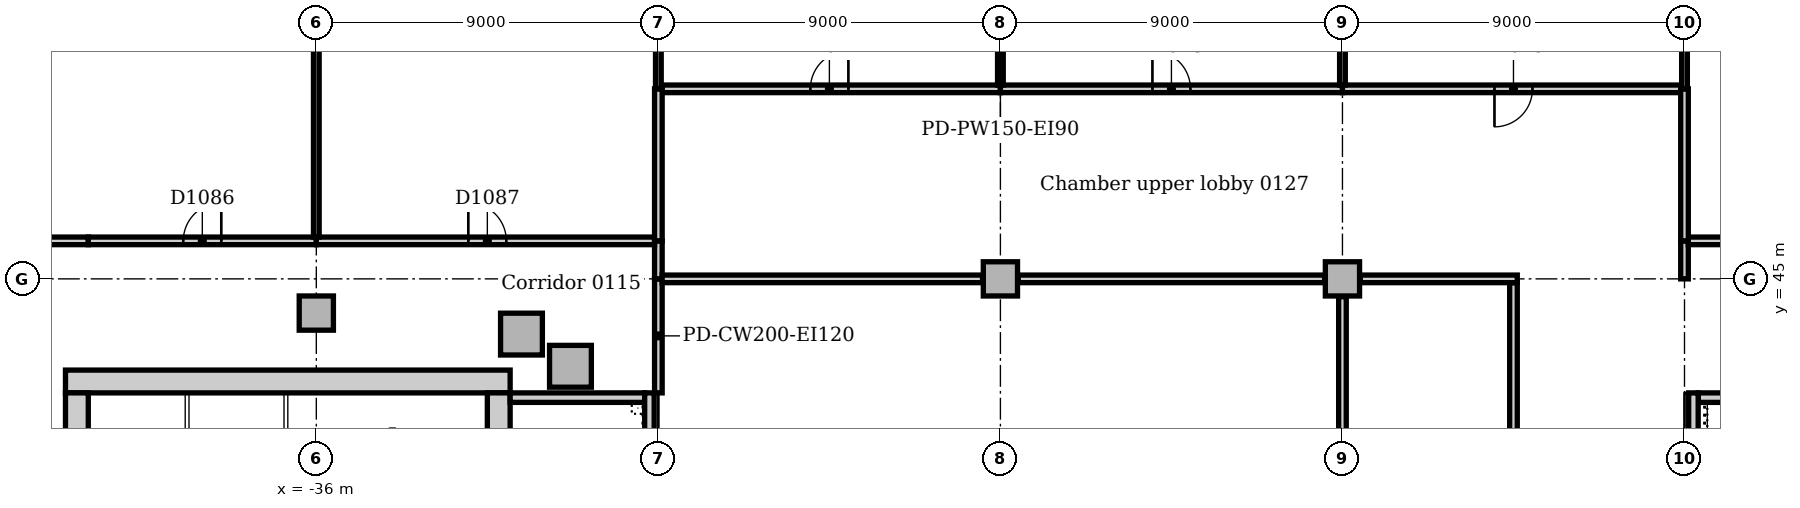
"""IFC4 building model, lengths in metres.
Left out: names, types, materials, properties, quantities, classifications, styles, units other than length and angle.
Written with IfcOpenShell. Run it as: python <this file> out.ifc"""

import sys

from ifc_helpers import new_model, si_unit, direction, frame, frame_2d, origin, origin_2d, place, context, subcontext, project, spatial, rectangle, extrude, element, fill, save


model = new_model("IFC4")
c1 = context("Model", 3, precision=1e-05, world=origin(), true_north=direction((0.0, 1.0)))
c2 = subcontext(c1, "Body", "Model", "MODEL_VIEW")
j1 = project(units=[si_unit("LENGTHUNIT", "METRE"), si_unit("PLANEANGLEUNIT", "RADIAN")], contexts=[c1])
p1 = place(None, origin())
s1 = spatial("IfcSite", under=j1, at=p1, CompositionType="ELEMENT")
p2 = place(p1, origin())
s2 = spatial("IfcBuilding", under=s1, at=p2, CompositionType="ELEMENT")
p3 = place(p2, frame((0.0, 0.0, 6.0)))
s3 = spatial("IfcBuildingStorey", under=s2, at=p3, CompositionType="ELEMENT", Elevation=6.0)
p4 = place(p3, frame((3.9, 41.875, 0.0), z_axis=(0.0, 0.0, 1.0), x_axis=(-1.0, 0.0, 0.0)))
e1 = element("IfcWall", 1, at=p4, inside=s3, PredefinedType="SOLIDWALL", context=c2, shape_type="SweptSolid", body=[
    extrude(rectangle(XDim=3.54, YDim=0.25, at=frame_2d((1.77, 0.0))), origin(), (0.0, 0.0, 1.0), 5.0),
])
p5 = place(p3, frame((0.235, 21.0, 0.0), z_axis=(0.0, 0.0, 1.0), x_axis=(0.0, 1.0, 0.0)))
e2 = element("IfcWall", 2, at=p5, inside=s3, PredefinedType="SOLIDWALL", context=c2, shape_type="SweptSolid", body=[
    extrude(rectangle(XDim=21.0, YDim=0.25, at=frame_2d((10.5, 0.0))), origin(), (0.0, 0.0, 1.0), 5.0),
])
p6 = place(p3, frame((-30.9, 42.3, 0.0), z_axis=(0.0, 0.0, 1.0), x_axis=(-1.0, 0.0, 0.0)))
e3 = element("IfcWall", 3, at=p6, inside=s3, PredefinedType="SOLIDWALL", context=c2, shape_type="SweptSolid", body=[
    extrude(rectangle(XDim=11.7, YDim=0.6, at=frame_2d((5.85, 0.0))), origin(), (0.0, 0.0, 1.0), 5.0),
])
p7 = place(p3, frame((-31.2, 30.5, 0.0), z_axis=(0.0, 0.0, 1.0), x_axis=(0.0, 1.0, 0.0)))
e4 = element("IfcWall", 4, at=p7, inside=s3, PredefinedType="SOLIDWALL", context=c2, shape_type="SweptSolid", body=[
    extrude(rectangle(XDim=11.5, YDim=0.6, at=frame_2d((5.75, 0.0))), origin(), (0.0, 0.0, 1.0), 5.0),
])
p8 = place(p7, frame((0.85, 0.0, 0.0)))
e5 = element("IfcOpeningElement", 5, at=p8, cuts=e4, PredefinedType="OPENING", context=c2, shape_type="SweptSolid", body=[
    extrude(rectangle(XDim=1.8, YDim=2.1, at=frame_2d((0.9, 1.05))), frame((0.0, 0.31, 0.0), z_axis=(0.0, -1.0, 0.0), x_axis=(1.0, 0.0, 0.0)), (0.0, 0.0, 1.0), 0.62),
])
p9 = place(p3, frame((-42.3, 42.0, 0.0), z_axis=(0.0, 0.0, 1.0), x_axis=(0.0, -1.0, 0.0)))
e6 = element("IfcWall", 6, at=p9, inside=s3, PredefinedType="SOLIDWALL", context=c2, shape_type="SweptSolid", body=[
    extrude(rectangle(XDim=11.5, YDim=0.6, at=frame_2d((5.75, 0.0))), origin(), (0.0, 0.0, 1.0), 5.0),
])
p10 = place(p9, frame((8.85, 0.0, 0.0)))
e7 = element("IfcOpeningElement", 7, at=p10, cuts=e6, PredefinedType="OPENING", context=c2, shape_type="SweptSolid", body=[
    extrude(rectangle(XDim=1.8, YDim=2.1, at=frame_2d((0.9, 1.05))), frame((0.0, 0.31, 0.0), z_axis=(0.0, -1.0, 0.0), x_axis=(1.0, 0.0, 0.0)), (0.0, 0.0, 1.0), 0.62),
])
p11 = place(p3, frame((-27.36, 41.875, 0.0), z_axis=(0.0, 0.0, 1.0), x_axis=(-1.0, 0.0, 0.0)))
e8 = element("IfcWall", 8, at=p11, inside=s3, PredefinedType="SOLIDWALL", context=c2, shape_type="SweptSolid", body=[
    extrude(rectangle(XDim=3.54, YDim=0.25, at=frame_2d((1.77, 0.0))), origin(), (0.0, 0.0, 1.0), 5.0),
])
p12 = place(p3, frame((-27.235, 35.35, 0.0), z_axis=(0.0, 0.0, 1.0), x_axis=(0.0, 1.0, 0.0)))
e9 = element("IfcWall", 9, at=p12, inside=s3, PredefinedType="SOLIDWALL", context=c2, shape_type="SweptSolid", body=[
    extrude(rectangle(XDim=6.65, YDim=0.25, at=frame_2d((3.325, 0.0))), origin(), (0.0, 0.0, 1.0), 5.0),
])
for number, where, z_axis, x_axis in (
    (10, (-29.313, 42.7, 0.0), (0.0, 0.0, 1.0), (1.0, 0.0, 0.0)),
    (11, (-30.602, 43.547, 0.0), (0.0, 0.0, 1.0), (1.0, 0.0, 0.0)),
):
    element("IfcColumn", number, at=place(p3, frame(where, z_axis=z_axis, x_axis=x_axis)), inside=s3, PredefinedType="COLUMN", context=c2, shape_type="SweptSolid", body=[
        extrude(rectangle(XDim=1.1, YDim=1.1, at=origin_2d()), origin(), (0.0, 0.0, 1.0), 4.7),
    ])
for number, where, z_axis, x_axis in (
    (12, (-36.0, 44.1, 0.0), (0.0, 0.0, 1.0), (1.0, 0.0, 0.0)),
    (13, (-18.0, 45.0, 0.0), (0.0, 0.0, 1.0), (1.0, 0.0, 0.0)),
    (14, (-9.0, 45.0, 0.0), (0.0, 0.0, 1.0), (1.0, 0.0, 0.0)),
):
    element("IfcColumn", number, at=place(p3, frame(where, z_axis=z_axis, x_axis=x_axis)), inside=s3, PredefinedType="COLUMN", context=c2, shape_type="SweptSolid", body=[
        extrude(rectangle(XDim=0.9, YDim=0.9, at=origin_2d()), origin(), (0.0, 0.0, 1.0), 4.7),
    ])
p13 = place(p3, frame((-44.9, 46.0, 0.0), z_axis=(0.0, 0.0, 1.0), x_axis=(1.0, 0.0, 0.0)))
e15 = element("IfcWall", 15, at=p13, inside=s3, PredefinedType="PARTITIONING", context=c2, shape_type="SweptSolid", body=[
    extrude(rectangle(XDim=2.9, YDim=0.2, at=frame_2d((1.45, 0.0))), origin(), (0.0, 0.0, 1.0), 4.7),
])
p14 = place(p3, frame((-27.0, 42.0, 0.0), z_axis=(0.0, 0.0, 1.0), x_axis=(0.0, 1.0, 0.0)))
e16 = element("IfcWall", 16, at=p14, inside=s3, PredefinedType="PARTITIONING", context=c2, shape_type="SweptSolid", body=[
    extrude(rectangle(XDim=3.0, YDim=0.2, at=frame_2d((1.5, 0.0))), origin(), (0.0, 0.0, 1.0), 4.7),
])
p15 = place(p3, frame((-27.0, 45.0, 0.0), z_axis=(0.0, 0.0, 1.0), x_axis=(0.0, 1.0, 0.0)))
e17 = element("IfcWall", 17, at=p15, inside=s3, PredefinedType="PARTITIONING", context=c2, shape_type="SweptSolid", body=[
    extrude(rectangle(XDim=1.0, YDim=0.2, at=frame_2d((0.5, 0.0))), origin(), (0.0, 0.0, 1.0), 4.7),
])
p16 = place(p3, frame((-42.0, 46.0, 0.0), z_axis=(0.0, 0.0, 1.0), x_axis=(1.0, 0.0, 0.0)))
e18 = element("IfcWall", 18, at=p16, inside=s3, PredefinedType="PARTITIONING", context=c2, shape_type="SweptSolid", body=[
    extrude(rectangle(XDim=6.0, YDim=0.2, at=frame_2d((3.0, 0.0))), origin(), (0.0, 0.0, 1.0), 4.7),
])
p17 = place(p16, frame((2.5, 0.0, 0.0)))
e19 = element("IfcOpeningElement", 19, at=p17, cuts=e18, PredefinedType="OPENING", context=c2, shape_type="SweptSolid", body=[
    extrude(rectangle(XDim=1.0, YDim=2.1, at=frame_2d((0.5, 1.05))), frame((0.0, 0.11, 0.0), z_axis=(0.0, -1.0, 0.0), x_axis=(1.0, 0.0, 0.0)), (0.0, 0.0, 1.0), 0.22),
])
p18 = place(p3, frame((-36.0, 46.0, 0.0), z_axis=(0.0, 0.0, 1.0), x_axis=(1.0, 0.0, 0.0)))
e20 = element("IfcWall", 20, at=p18, inside=s3, PredefinedType="PARTITIONING", context=c2, shape_type="SweptSolid", body=[
    extrude(rectangle(XDim=8.9, YDim=0.2, at=frame_2d((4.45, 0.0))), origin(), (0.0, 0.0, 1.0), 4.7),
])
p19 = place(p18, frame((4.0, 0.0, 0.0)))
e21 = element("IfcOpeningElement", 21, at=p19, cuts=e20, PredefinedType="OPENING", context=c2, shape_type="SweptSolid", body=[
    extrude(rectangle(XDim=1.0, YDim=2.1, at=frame_2d((0.5, 1.05))), frame((0.0, 0.11, 0.0), z_axis=(0.0, -1.0, 0.0), x_axis=(1.0, 0.0, 0.0)), (0.0, 0.0, 1.0), 0.22),
])
p20 = place(p3, frame((0.0, 45.0, 0.0), z_axis=(0.0, 0.0, 1.0), x_axis=(0.0, 1.0, 0.0)))
e22 = element("IfcWall", 22, at=p20, inside=s3, PredefinedType="PARTITIONING", context=c2, shape_type="SweptSolid", body=[
    extrude(rectangle(XDim=1.0, YDim=0.2, at=frame_2d((0.5, 0.0))), origin(), (0.0, 0.0, 1.0), 4.7),
])
p21 = place(p3, frame((0.1, 46.0, 0.0), z_axis=(0.0, 0.0, 1.0), x_axis=(1.0, 0.0, 0.0)))
e23 = element("IfcWall", 23, at=p21, inside=s3, PredefinedType="PARTITIONING", context=c2, shape_type="SweptSolid", body=[
    extrude(rectangle(XDim=8.9, YDim=0.2, at=frame_2d((4.45, 0.0))), origin(), (0.0, 0.0, 1.0), 4.7),
])
p22 = place(p21, frame((3.9, 0.0, 0.0)))
e24 = element("IfcOpeningElement", 24, at=p22, cuts=e23, PredefinedType="OPENING", context=c2, shape_type="SweptSolid", body=[
    extrude(rectangle(XDim=1.0, YDim=2.1, at=frame_2d((0.5, 1.05))), frame((0.0, 0.11, 0.0), z_axis=(0.0, -1.0, 0.0), x_axis=(1.0, 0.0, 0.0)), (0.0, 0.0, 1.0), 0.22),
])
p23 = place(p3, frame((-4.5, 36.1, 0.0), z_axis=(0.0, 0.0, 1.0), x_axis=(0.0, 1.0, 0.0)))
e25 = element("IfcWall", 25, at=p23, inside=s3, PredefinedType="PARTITIONING", context=c2, shape_type="SweptSolid", body=[
    extrude(rectangle(XDim=8.8, YDim=0.2, at=frame_2d((4.4, 0.0))), origin(), (0.0, 0.0, 1.0), 4.7),
])
p24 = place(p3, frame((-9.0, 36.47, 0.0), z_axis=(0.0, 0.0, 1.0), x_axis=(0.0, 1.0, 0.0)))
e26 = element("IfcWall", 26, at=p24, inside=s3, PredefinedType="PARTITIONING", context=c2, shape_type="SweptSolid", body=[
    extrude(rectangle(XDim=8.06, YDim=0.2, at=frame_2d((4.03, 0.0))), origin(), (0.0, 0.0, 1.0), 4.7),
])
p25 = place(p24, frame((1.28, 0.0, 0.0)))
e27 = element("IfcOpeningElement", 27, at=p25, cuts=e26, PredefinedType="OPENING", context=c2, shape_type="SweptSolid", body=[
    extrude(rectangle(XDim=1.0, YDim=2.1, at=frame_2d((0.5, 1.05))), frame((0.0, 0.11, 0.0), z_axis=(0.0, -1.0, 0.0), x_axis=(1.0, 0.0, 0.0)), (0.0, 0.0, 1.0), 0.22),
])
p26 = place(p3, frame((-8.53, 45.0, 0.0), z_axis=(0.0, 0.0, 1.0), x_axis=(1.0, 0.0, 0.0)))
e28 = element("IfcWall", 28, at=p26, inside=s3, PredefinedType="PARTITIONING", context=c2, shape_type="SweptSolid", body=[
    extrude(rectangle(XDim=4.13, YDim=0.2, at=frame_2d((2.065, 0.0))), origin(), (0.0, 0.0, 1.0), 4.7),
])
p27 = place(p3, frame((-26.9, 45.0, 0.0), z_axis=(0.0, 0.0, 1.0), x_axis=(1.0, 0.0, 0.0)))
e29 = element("IfcWall", 29, at=p27, inside=s3, PredefinedType="PARTITIONING", context=c2, shape_type="SweptSolid", body=[
    extrude(rectangle(XDim=8.43, YDim=0.2, at=frame_2d((4.215, 0.0))), origin(), (0.0, 0.0, 1.0), 4.7),
])
p28 = place(p3, frame((-17.53, 45.0, 0.0), z_axis=(0.0, 0.0, 1.0), x_axis=(1.0, 0.0, 0.0)))
e30 = element("IfcWall", 30, at=p28, inside=s3, PredefinedType="PARTITIONING", context=c2, shape_type="SweptSolid", body=[
    extrude(rectangle(XDim=8.06, YDim=0.2, at=frame_2d((4.03, 0.0))), origin(), (0.0, 0.0, 1.0), 4.7),
])
p29 = place(p3, frame((-26.9, 50.0, 0.0), z_axis=(0.0, 0.0, 1.0), x_axis=(1.0, 0.0, 0.0)))
e31 = element("IfcWall", 31, at=p29, inside=s3, PredefinedType="PARTITIONING", context=c2, shape_type="SweptSolid", body=[
    extrude(rectangle(XDim=8.9, YDim=0.2, at=frame_2d((4.45, 0.0))), origin(), (0.0, 0.0, 1.0), 4.7),
])
p30 = place(p29, frame((3.9, 0.0, 0.0)))
e32 = element("IfcOpeningElement", 32, at=p30, cuts=e31, PredefinedType="OPENING", context=c2, shape_type="SweptSolid", body=[
    extrude(rectangle(XDim=1.0, YDim=2.1, at=frame_2d((0.5, 1.05))), frame((0.0, 0.11, 0.0), z_axis=(0.0, -1.0, 0.0), x_axis=(1.0, 0.0, 0.0)), (0.0, 0.0, 1.0), 0.22),
])
p31 = place(p3, frame((-18.0, 50.0, 0.0), z_axis=(0.0, 0.0, 1.0), x_axis=(1.0, 0.0, 0.0)))
e33 = element("IfcWall", 33, at=p31, inside=s3, PredefinedType="PARTITIONING", context=c2, shape_type="SweptSolid", body=[
    extrude(rectangle(XDim=9.0, YDim=0.2, at=frame_2d((4.5, 0.0))), origin(), (0.0, 0.0, 1.0), 4.7),
])
p32 = place(p31, frame((4.0, 0.0, 0.0)))
e34 = element("IfcOpeningElement", 34, at=p32, cuts=e33, PredefinedType="OPENING", context=c2, shape_type="SweptSolid", body=[
    extrude(rectangle(XDim=1.0, YDim=2.1, at=frame_2d((0.5, 1.05))), frame((0.0, 0.11, 0.0), z_axis=(0.0, -1.0, 0.0), x_axis=(1.0, 0.0, 0.0)), (0.0, 0.0, 1.0), 0.22),
])
p33 = place(p3, frame((-9.0, 50.0, 0.0), z_axis=(0.0, 0.0, 1.0), x_axis=(1.0, 0.0, 0.0)))
e35 = element("IfcWall", 35, at=p33, inside=s3, PredefinedType="PARTITIONING", context=c2, shape_type="SweptSolid", body=[
    extrude(rectangle(XDim=8.9, YDim=0.2, at=frame_2d((4.45, 0.0))), origin(), (0.0, 0.0, 1.0), 4.7),
])
p34 = place(p33, frame((4.0, 0.0, 0.0)))
e36 = element("IfcOpeningElement", 36, at=p34, cuts=e35, PredefinedType="OPENING", context=c2, shape_type="SweptSolid", body=[
    extrude(rectangle(XDim=1.0, YDim=2.1, at=frame_2d((0.5, 1.05))), frame((0.0, 0.11, 0.0), z_axis=(0.0, -1.0, 0.0), x_axis=(1.0, 0.0, 0.0)), (0.0, 0.0, 1.0), 0.22),
])
for number, where, z_axis, x_axis in (
    (37, (-27.0, 46.0, 0.0), (0.0, 0.0, 1.0), (0.0, 1.0, 0.0)),
    (38, (0.0, 46.0, 0.0), (0.0, 0.0, 1.0), (0.0, 1.0, 0.0)),
):
    element("IfcWall", number, at=place(p3, frame(where, z_axis=z_axis, x_axis=x_axis)), inside=s3, PredefinedType="PARTITIONING", context=c2, shape_type="SweptSolid", body=[
        extrude(rectangle(XDim=4.0, YDim=0.2, at=frame_2d((2.0, 0.0))), origin(), (0.0, 0.0, 1.0), 4.7),
    ])
p35 = place(p3, frame((-18.0, 50.1, 0.0), z_axis=(0.0, 0.0, 1.0), x_axis=(0.0, 1.0, 0.0)))
e39 = element("IfcWall", 39, at=p35, inside=s3, PredefinedType="PARTITIONING", context=c2, shape_type="SweptSolid", body=[
    extrude(rectangle(XDim=3.43, YDim=0.15, at=frame_2d((1.715, 0.0))), origin(), (0.0, 0.0, 1.0), 4.7),
])
p36 = place(p3, frame((-27.0, 50.0, 0.0), z_axis=(0.0, 0.0, 1.0), x_axis=(0.0, 1.0, 0.0)))
e40 = element("IfcWall", 40, at=p36, inside=s3, PredefinedType="PARTITIONING", context=c2, shape_type="SweptSolid", body=[
    extrude(rectangle(XDim=3.53, YDim=0.15, at=frame_2d((1.765, 0.0))), origin(), (0.0, 0.0, 1.0), 4.7),
])
p37 = place(p3, frame((-9.0, 50.1, 0.0), z_axis=(0.0, 0.0, 1.0), x_axis=(0.0, 1.0, 0.0)))
e41 = element("IfcWall", 41, at=p37, inside=s3, PredefinedType="PARTITIONING", context=c2, shape_type="SweptSolid", body=[
    extrude(rectangle(XDim=3.43, YDim=0.15, at=frame_2d((1.715, 0.0))), origin(), (0.0, 0.0, 1.0), 4.7),
])
p38 = place(p3, frame((0.0, 50.0, 0.0), z_axis=(0.0, 0.0, 1.0), x_axis=(0.0, 1.0, 0.0)))
e42 = element("IfcWall", 42, at=p38, inside=s3, PredefinedType="PARTITIONING", context=c2, shape_type="SweptSolid", body=[
    extrude(rectangle(XDim=3.53, YDim=0.15, at=frame_2d((1.765, 0.0))), origin(), (0.0, 0.0, 1.0), 4.7),
])
p39 = place(p3, frame((-36.0, 46.1, 0.0), z_axis=(0.0, 0.0, 1.0), x_axis=(0.0, 1.0, 0.0)))
e43 = element("IfcWall", 43, at=p39, inside=s3, PredefinedType="PARTITIONING", context=c2, shape_type="SweptSolid", body=[
    extrude(rectangle(XDim=7.43, YDim=0.15, at=frame_2d((3.715, 0.0))), origin(), (0.0, 0.0, 1.0), 4.7),
])
p40 = place(p3, frame((0.48, 39.795, 0.0), z_axis=(0.0, 0.0, 1.0), x_axis=(0.0, 1.0, 0.0)))
e44 = element("IfcWall", 44, at=p40, inside=s3, PredefinedType="STANDARD", context=c2, shape_type="SweptSolid", body=[
    extrude(rectangle(XDim=1.955, YDim=0.24, at=frame_2d((0.978, 0.0))), origin(), (0.0, 0.0, 1.0), 5.0),
])
p41 = place(p3, frame((-34.0, 41.075, 0.0), z_axis=(0.0, 0.0, 1.0), x_axis=(0.0, -1.0, 0.0)))
e45 = element("IfcWall", 45, at=p41, inside=s3, PredefinedType="SOLIDWALL", context=c2, shape_type="SweptSolid", body=[
    extrude(rectangle(XDim=7.0, YDim=0.15, at=frame_2d((3.5, 0.0))), origin(), (0.0, 0.0, 1.0), 5.0),
])
for number, where, z_axis, x_axis in (
    (46, (-39.4, 34.075, 0.0), (0.0, 0.0, 1.0), (0.0, 1.0, 0.0)),
    (47, (-36.8, 34.075, 0.0), (0.0, 0.0, 1.0), (0.0, 1.0, 0.0)),
):
    element("IfcWall", number, at=place(p3, frame(where, z_axis=z_axis, x_axis=x_axis)), inside=s3, PredefinedType="PARTITIONING", context=c2, shape_type="SweptSolid", body=[
        extrude(rectangle(XDim=7.925, YDim=0.1, at=frame_2d((3.962, 0.0))), origin(), (0.0, 0.0, 1.0), 4.7),
    ])
p42 = place(p30, origin())
e48 = element("IfcDoor", 48, at=p42, inside=s3, OperationType="SINGLE_SWING_RIGHT", PredefinedType="DOOR", context=c2, shape_type="SweptSolid", body=[
    extrude(rectangle(XDim=1.0, YDim=2.1, at=frame_2d((0.5, 1.05))), frame((0.0, 0.025, 0.0), z_axis=(0.0, -1.0, 0.0), x_axis=(1.0, 0.0, 0.0)), (0.0, 0.0, 1.0), 0.05),
])
fill(e32, e48)
p43 = place(p32, origin())
e49 = element("IfcDoor", 49, at=p43, inside=s3, OperationType="SINGLE_SWING_LEFT", PredefinedType="DOOR", context=c2, shape_type="SweptSolid", body=[
    extrude(rectangle(XDim=1.0, YDim=2.1, at=frame_2d((0.5, 1.05))), frame((0.0, 0.025, 0.0), z_axis=(0.0, -1.0, 0.0), x_axis=(1.0, 0.0, 0.0)), (0.0, 0.0, 1.0), 0.05),
])
fill(e34, e49)
p44 = place(p34, frame((1.0, 0.0, 0.0), z_axis=(0.0, 0.0, 1.0), x_axis=(-1.0, 0.0, 0.0)))
e50 = element("IfcDoor", 50, at=p44, inside=s3, OperationType="SINGLE_SWING_RIGHT", PredefinedType="DOOR", context=c2, shape_type="SweptSolid", body=[
    extrude(rectangle(XDim=1.0, YDim=2.1, at=frame_2d((0.5, 1.05))), frame((0.0, 0.025, 0.0), z_axis=(0.0, -1.0, 0.0), x_axis=(1.0, 0.0, 0.0)), (0.0, 0.0, 1.0), 0.05),
])
fill(e36, e50)
p45 = place(p17, origin())
e51 = element("IfcDoor", 51, at=p45, inside=s3, OperationType="SINGLE_SWING_RIGHT", PredefinedType="DOOR", context=c2, shape_type="SweptSolid", body=[
    extrude(rectangle(XDim=1.0, YDim=2.1, at=frame_2d((0.5, 1.05))), frame((0.0, 0.025, 0.0), z_axis=(0.0, -1.0, 0.0), x_axis=(1.0, 0.0, 0.0)), (0.0, 0.0, 1.0), 0.05),
])
fill(e19, e51)
p46 = place(p19, origin())
e52 = element("IfcDoor", 52, at=p46, inside=s3, OperationType="SINGLE_SWING_LEFT", PredefinedType="DOOR", context=c2, shape_type="SweptSolid", body=[
    extrude(rectangle(XDim=1.0, YDim=2.1, at=frame_2d((0.5, 1.05))), frame((0.0, 0.025, 0.0), z_axis=(0.0, -1.0, 0.0), x_axis=(1.0, 0.0, 0.0)), (0.0, 0.0, 1.0), 0.05),
])
fill(e21, e52)
save(model, sys.argv[1])
